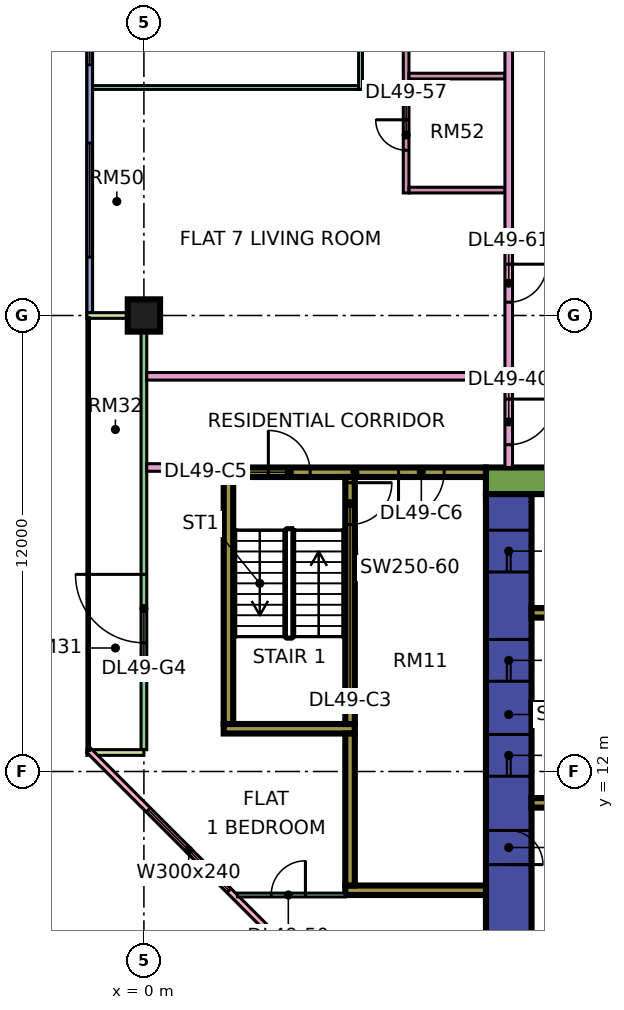
"""IFC4 building model, lengths in metres.
Left out: names, types, materials, properties, quantities, classifications, styles, units other than length and angle.
Written with IfcOpenShell. Run it as: python <this file> out.ifc"""

import sys

from ifc_helpers import new_model, si_unit, direction, frame, frame_2d, origin, origin_2d, place, context, subcontext, project, spatial, rectangle, extrude, element, fill, save


model = new_model("IFC4")
c1 = context("Model", 3, precision=1e-05, world=origin(), true_north=direction((0.0, 1.0)))
c2 = subcontext(c1, "Body", "Model", "MODEL_VIEW")
j1 = project(units=[si_unit("LENGTHUNIT", "METRE"), si_unit("PLANEANGLEUNIT", "RADIAN")], contexts=[c1])
p1 = place(None, origin())
s1 = spatial("IfcSite", under=j1, at=p1, CompositionType="ELEMENT")
p2 = place(p1, origin())
s2 = spatial("IfcBuilding", under=s1, at=p2, CompositionType="ELEMENT")
p3 = place(p2, frame((0.0, 0.0, 211.65)))
s3 = spatial("IfcBuildingStorey", under=s2, at=p3, CompositionType="ELEMENT", Elevation=211.65)
p4 = place(p3, frame((0.0, 24.0, 0.0), z_axis=(0.0, 0.0, 1.0), x_axis=(1.0, 0.0, 0.0)))
e1 = element("IfcColumn", 1, at=p4, inside=s3, PredefinedType="COLUMN", context=c2, shape_type="SweptSolid", body=[
    extrude(rectangle(XDim=0.85, YDim=0.85, at=origin_2d()), origin(), (0.0, 0.0, 1.0), 3.75),
])
p5 = place(p3, frame((9.0, 19.65, 0.0), z_axis=(0.0, 0.0, 1.0), x_axis=(1.0, 0.0, 0.0)))
e2 = element("IfcWall", 2, at=p5, inside=s3, PredefinedType="SHEAR", context=c2, shape_type="SweptSolid", body=[
    extrude(rectangle(XDim=25.0, YDim=0.7, at=frame_2d((12.5, 0.0))), origin(), (0.0, 0.0, 1.0), 3.75),
])
p6 = place(p5, frame((19.1, 0.0, 0.0)))
e3 = element("IfcOpeningElement", 3, at=p6, cuts=e2, PredefinedType="OPENING", context=c2, shape_type="SweptSolid", body=[
    extrude(rectangle(XDim=1.8, YDim=2.4, at=frame_2d((0.9, 1.2))), frame((0.0, 0.36, 0.0), z_axis=(0.0, -1.0, 0.0), x_axis=(1.0, 0.0, 0.0)), (0.0, 0.0, 1.0), 0.72),
])
p7 = place(p3, frame((9.6, 7.7, 0.0), z_axis=(0.0, 0.0, 1.0), x_axis=(0.0, 1.0, 0.0)))
e4 = element("IfcWall", 4, at=p7, inside=s3, PredefinedType="SHEAR", context=c2, shape_type="SweptSolid", body=[
    extrude(rectangle(XDim=11.6, YDim=1.2, at=frame_2d((5.8, 0.0))), origin(), (0.0, 0.0, 1.0), 3.75),
])
p8 = place(p7, frame((4.175, 0.0, 0.0)))
e5 = element("IfcOpeningElement", 5, at=p8, cuts=e4, PredefinedType="OPENING", context=c2, shape_type="SweptSolid", body=[
    extrude(rectangle(XDim=1.1, YDim=2.2, at=frame_2d((0.55, 1.1))), frame((0.0, 0.61, 0.0), z_axis=(0.0, -1.0, 0.0), x_axis=(1.0, 0.0, 0.0)), (0.0, 0.0, 1.0), 1.22),
])
p9 = place(p7, frame((6.675, 0.0, 0.0)))
e6 = element("IfcOpeningElement", 6, at=p9, cuts=e4, PredefinedType="OPENING", context=c2, shape_type="SweptSolid", body=[
    extrude(rectangle(XDim=1.1, YDim=2.2, at=frame_2d((0.55, 1.1))), frame((0.0, 0.61, 0.0), z_axis=(0.0, -1.0, 0.0), x_axis=(1.0, 0.0, 0.0)), (0.0, 0.0, 1.0), 1.22),
])
p10 = place(p7, frame((9.55, 0.0, 0.0)))
e7 = element("IfcOpeningElement", 7, at=p10, cuts=e4, PredefinedType="OPENING", context=c2, shape_type="SweptSolid", body=[
    extrude(rectangle(XDim=1.1, YDim=2.2, at=frame_2d((0.55, 1.1))), frame((0.0, 0.61, 0.0), z_axis=(0.0, -1.0, 0.0), x_axis=(1.0, 0.0, 0.0)), (0.0, 0.0, 1.0), 1.22),
])
p11 = place(p7, frame((1.85, 0.0, 0.0)))
e8 = element("IfcOpeningElement", 8, at=p11, cuts=e4, PredefinedType="OPENING", context=c2, shape_type="SweptSolid", body=[
    extrude(rectangle(XDim=0.9, YDim=2.1, at=frame_2d((0.45, 1.05))), frame((0.0, 0.61, 0.0), z_axis=(0.0, -1.0, 0.0), x_axis=(1.0, 0.0, 0.0)), (0.0, 0.0, 1.0), 1.22),
])
for number, where, z_axis, x_axis in (
    (9, (10.2, 11.175, 0.0), (0.0, 0.0, 1.0), (1.0, 0.0, 0.0)),
    (10, (10.2, 13.675, 0.0), (0.0, 0.0, 1.0), (1.0, 0.0, 0.0)),
    (11, (10.2, 16.175, 0.0), (0.0, 0.0, 1.0), (1.0, 0.0, 0.0)),
):
    element("IfcWall", number, at=place(p3, frame(where, z_axis=z_axis, x_axis=x_axis)), inside=s3, PredefinedType="SHEAR", context=c2, shape_type="SweptSolid", body=[
        extrude(rectangle(XDim=3.0, YDim=0.25, at=frame_2d((1.5, 0.0))), origin(), (0.0, 0.0, 1.0), 3.75),
    ])
p12 = place(p3, frame((2.1, 19.875, 0.0), z_axis=(0.0, 0.0, 1.0), x_axis=(1.0, 0.0, 0.0)))
e12 = element("IfcWall", 12, at=p12, inside=s3, PredefinedType="SHEAR", context=c2, shape_type="SweptSolid", body=[
    extrude(rectangle(XDim=6.9, YDim=0.25, at=frame_2d((3.45, 0.0))), origin(), (0.0, 0.0, 1.0), 3.75),
])
p13 = place(p12, frame((1.175, 0.0, 0.0)))
e13 = element("IfcOpeningElement", 13, at=p13, cuts=e12, PredefinedType="OPENING", context=c2, shape_type="SweptSolid", body=[
    extrude(rectangle(XDim=1.1, YDim=2.2, at=frame_2d((0.55, 1.1))), frame((0.0, 0.135, 0.0), z_axis=(0.0, -1.0, 0.0), x_axis=(1.0, 0.0, 0.0)), (0.0, 0.0, 1.0), 0.27),
])
p14 = place(p12, frame((4.6, 0.0, 0.0)))
e14 = element("IfcOpeningElement", 14, at=p14, cuts=e12, PredefinedType="OPENING", context=c2, shape_type="SweptSolid", body=[
    extrude(rectangle(XDim=1.2, YDim=2.2, at=frame_2d((0.6, 1.1))), frame((0.0, 0.135, 0.0), z_axis=(0.0, -1.0, 0.0), x_axis=(1.0, 0.0, 0.0)), (0.0, 0.0, 1.0), 0.27),
])
p15 = place(p3, frame((2.1, 13.125, 0.0), z_axis=(0.0, 0.0, 1.0), x_axis=(1.0, 0.0, 0.0)))
e15 = element("IfcWall", 15, at=p15, inside=s3, PredefinedType="SHEAR", context=c2, shape_type="SweptSolid", body=[
    extrude(rectangle(XDim=3.45, YDim=0.25, at=frame_2d((1.725, 0.0))), origin(), (0.0, 0.0, 1.0), 3.75),
])
p16 = place(p3, frame((2.225, 13.25, 0.0), z_axis=(0.0, 0.0, 1.0), x_axis=(0.0, 1.0, 0.0)))
e16 = element("IfcWall", 16, at=p16, inside=s3, PredefinedType="SHEAR", context=c2, shape_type="SweptSolid", body=[
    extrude(rectangle(XDim=6.5, YDim=0.25, at=frame_2d((3.25, 0.0))), origin(), (0.0, 0.0, 1.0), 3.75),
])
p17 = place(p3, frame((5.425, 13.25, 0.0), z_axis=(0.0, 0.0, 1.0), x_axis=(0.0, 1.0, 0.0)))
e17 = element("IfcWall", 17, at=p17, inside=s3, PredefinedType="SHEAR", context=c2, shape_type="SweptSolid", body=[
    extrude(rectangle(XDim=6.5, YDim=0.25, at=frame_2d((3.25, 0.0))), origin(), (0.0, 0.0, 1.0), 3.75),
])
p18 = place(p17, frame((5.25, 0.0, 0.0)))
e18 = element("IfcOpeningElement", 18, at=p18, cuts=e17, PredefinedType="OPENING", context=c2, shape_type="SweptSolid", body=[
    extrude(rectangle(XDim=1.1, YDim=2.2, at=frame_2d((0.55, 1.1))), frame((0.0, 0.135, 0.0), z_axis=(0.0, -1.0, 0.0), x_axis=(1.0, 0.0, 0.0)), (0.0, 0.0, 1.0), 0.27),
])
p19 = place(p3, frame((5.3, 8.875, 0.0), z_axis=(0.0, 0.0, 1.0), x_axis=(1.0, 0.0, 0.0)))
e19 = element("IfcWall", 19, at=p19, inside=s3, PredefinedType="SHEAR", context=c2, shape_type="SweptSolid", body=[
    extrude(rectangle(XDim=3.7, YDim=0.25, at=frame_2d((1.85, 0.0))), origin(), (0.0, 0.0, 1.0), 3.75),
])
p20 = place(p3, frame((5.425, 9.0, 0.0), z_axis=(0.0, 0.0, 1.0), x_axis=(0.0, 1.0, 0.0)))
e20 = element("IfcWall", 20, at=p20, inside=s3, PredefinedType="SHEAR", context=c2, shape_type="SweptSolid", body=[
    extrude(rectangle(XDim=4.0, YDim=0.25, at=frame_2d((2.0, 0.0))), origin(), (0.0, 0.0, 1.0), 3.75),
])
p21 = place(p3, frame((-1.425, 35.925, 0.0), z_axis=(0.0, 0.0, 1.0), x_axis=(0.0, -1.0, 0.0)))
e21 = element("IfcWall", 21, at=p21, inside=s3, PredefinedType="SOLIDWALL", context=c2, shape_type="SweptSolid", body=[
    extrude(rectangle(XDim=11.85, YDim=0.15, at=frame_2d((5.925, 0.0))), origin(), (0.0, 0.0, 1.0), 3.35),
])
p22 = place(p21, frame((0.562, 0.0, 0.45)))
e22 = element("IfcOpeningElement", 22, at=p22, cuts=e21, PredefinedType="OPENING", context=c2, shape_type="SweptSolid", body=[
    extrude(rectangle(XDim=1.8, YDim=2.4, at=frame_2d((0.9, 1.2))), frame((0.0, 0.085, 0.0), z_axis=(0.0, -1.0, 0.0), x_axis=(1.0, 0.0, 0.0)), (0.0, 0.0, 1.0), 0.17),
])
p23 = place(p21, frame((3.525, 0.0, 0.45)))
e23 = element("IfcOpeningElement", 23, at=p23, cuts=e21, PredefinedType="OPENING", context=c2, shape_type="SweptSolid", body=[
    extrude(rectangle(XDim=1.8, YDim=2.4, at=frame_2d((0.9, 1.2))), frame((0.0, 0.085, 0.0), z_axis=(0.0, -1.0, 0.0), x_axis=(1.0, 0.0, 0.0)), (0.0, 0.0, 1.0), 0.17),
])
p24 = place(p21, frame((7.387, 0.0, 0.45)))
e24 = element("IfcOpeningElement", 24, at=p24, cuts=e21, PredefinedType="OPENING", context=c2, shape_type="SweptSolid", body=[
    extrude(rectangle(XDim=3.0, YDim=2.4, at=frame_2d((1.5, 1.2))), frame((0.0, 0.085, 0.0), z_axis=(0.0, -1.0, 0.0), x_axis=(1.0, 0.0, 0.0)), (0.0, 0.0, 1.0), 0.17),
])
p25 = place(p3, frame((0.0, 23.925, 0.0), z_axis=(0.0, 0.0, 1.0), x_axis=(0.0, -1.0, 0.0)))
e25 = element("IfcWall", 25, at=p25, inside=s3, PredefinedType="SOLIDWALL", context=c2, shape_type="SweptSolid", body=[
    extrude(rectangle(XDim=11.35, YDim=0.15, at=frame_2d((5.675, 0.0))), origin(), (0.0, 0.0, 1.0), 3.35),
])
p26 = place(p25, frame((6.738, 0.0, 0.0)))
e26 = element("IfcOpeningElement", 26, at=p26, cuts=e25, PredefinedType="OPENING", context=c2, shape_type="SweptSolid", body=[
    extrude(rectangle(XDim=1.8, YDim=2.4, at=frame_2d((0.9, 1.2))), frame((0.0, 0.085, 0.0), z_axis=(0.0, -1.0, 0.0), x_axis=(1.0, 0.0, 0.0)), (0.0, 0.0, 1.0), 0.17),
])
for number, where, z_axis, x_axis in (
    (27, (-1.5, 24.0, 0.0), (0.0, 0.0, 1.0), (1.0, 0.0, 0.0)),
    (28, (-1.5, 12.5, 0.0), (0.0, 0.0, 1.0), (1.0, 0.0, 0.0)),
):
    element("IfcWall", number, at=place(p3, frame(where, z_axis=z_axis, x_axis=x_axis)), inside=s3, PredefinedType="SOLIDWALL", context=c2, shape_type="SweptSolid", body=[
        extrude(rectangle(XDim=1.5, YDim=0.15, at=frame_2d((0.75, 0.0))), origin(), (0.0, 0.0, 1.0), 3.35),
    ])
p27 = place(p3, frame((-1.447, 12.553, 0.0), z_axis=(0.0, 0.0, 1.0), x_axis=(0.707106781187, -0.707106781187, 0.0)))
e29 = element("IfcWall", 29, at=p27, inside=s3, PredefinedType="SOLIDWALL", context=c2, shape_type="SweptSolid", body=[
    extrude(rectangle(XDim=19.799, YDim=0.15, at=frame_2d((9.899, 0.0))), origin(), (0.0, 0.0, 1.0), 3.35),
])
p28 = place(p27, frame((2.212, 0.0, 0.45)))
e30 = element("IfcOpeningElement", 30, at=p28, cuts=e29, PredefinedType="OPENING", context=c2, shape_type="SweptSolid", body=[
    extrude(rectangle(XDim=3.0, YDim=2.4, at=frame_2d((1.5, 1.2))), frame((0.0, 0.085, 0.0), z_axis=(0.0, -1.0, 0.0), x_axis=(1.0, 0.0, 0.0)), (0.0, 0.0, 1.0), 0.17),
])
p29 = place(p27, frame((10.216, 0.0, 0.45)))
e31 = element("IfcOpeningElement", 31, at=p29, cuts=e29, PredefinedType="OPENING", context=c2, shape_type="SweptSolid", body=[
    extrude(rectangle(XDim=3.0, YDim=2.4, at=frame_2d((1.5, 1.2))), frame((0.0, 0.085, 0.0), z_axis=(0.0, -1.0, 0.0), x_axis=(1.0, 0.0, 0.0)), (0.0, 0.0, 1.0), 0.17),
])
p30 = place(p3, frame((-1.35, 30.0, 0.0), z_axis=(0.0, 0.0, 1.0), x_axis=(1.0, 0.0, 0.0)))
e32 = element("IfcWall", 32, at=p30, inside=s3, PredefinedType="PARTITIONING", context=c2, shape_type="SweptSolid", body=[
    extrude(rectangle(XDim=7.0, YDim=0.1, at=frame_2d((3.5, 0.0))), origin(), (0.0, 0.0, 1.0), 3.35),
])
p31 = place(p3, frame((0.074, 20.0, 0.0), z_axis=(0.0, 0.0, 1.0), x_axis=(1.0, 0.0, 0.0)))
e33 = element("IfcWall", 33, at=p31, inside=s3, PredefinedType="PARTITIONING", context=c2, shape_type="SweptSolid", body=[
    extrude(rectangle(XDim=2.026, YDim=0.2, at=frame_2d((1.013, 0.0))), origin(), (0.0, 0.0, 1.0), 3.35),
])
p32 = place(p3, frame((0.074, 22.4, 0.0), z_axis=(0.0, 0.0, 1.0), x_axis=(1.0, 0.0, 0.0)))
e34 = element("IfcWall", 34, at=p32, inside=s3, PredefinedType="PARTITIONING", context=c2, shape_type="SweptSolid", body=[
    extrude(rectangle(XDim=9.426, YDim=0.2, at=frame_2d((4.713, 0.0))), origin(), (0.0, 0.0, 1.0), 3.35),
])
p33 = place(p3, frame((2.461, 8.75, 0.0), z_axis=(0.0, 0.0, 1.0), x_axis=(1.0, 0.0, 0.0)))
e35 = element("IfcWall", 35, at=p33, inside=s3, PredefinedType="PARTITIONING", context=c2, shape_type="SweptSolid", body=[
    extrude(rectangle(XDim=2.839, YDim=0.1, at=frame_2d((1.419, 0.0))), origin(), (0.0, 0.0, 1.0), 3.35),
])
p34 = place(p33, frame((0.889, 0.0, 0.0)))
e36 = element("IfcOpeningElement", 36, at=p34, cuts=e35, PredefinedType="OPENING", context=c2, shape_type="SweptSolid", body=[
    extrude(rectangle(XDim=0.9, YDim=2.1, at=frame_2d((0.45, 1.05))), frame((0.0, 0.06, 0.0), z_axis=(0.0, -1.0, 0.0), x_axis=(1.0, 0.0, 0.0)), (0.0, 0.0, 1.0), 0.12),
])
p35 = place(p3, frame((5.7, 29.95, 0.0), z_axis=(0.0, 0.0, 1.0), x_axis=(0.0, 1.0, 0.0)))
e37 = element("IfcWall", 37, at=p35, inside=s3, PredefinedType="PARTITIONING", context=c2, shape_type="SweptSolid", body=[
    extrude(rectangle(XDim=5.95, YDim=0.1, at=frame_2d((2.975, 0.0))), origin(), (0.0, 0.0, 1.0), 3.35),
])
p36 = place(p35, frame((1.1, 0.0, 0.0)))
e38 = element("IfcOpeningElement", 38, at=p36, cuts=e37, PredefinedType="OPENING", context=c2, shape_type="SweptSolid", body=[
    extrude(rectangle(XDim=0.9, YDim=2.1, at=frame_2d((0.45, 1.05))), frame((0.0, 0.06, 0.0), z_axis=(0.0, -1.0, 0.0), x_axis=(1.0, 0.0, 0.0)), (0.0, 0.0, 1.0), 0.12),
])
p37 = place(p35, frame((4.1, 0.0, 0.0)))
e39 = element("IfcOpeningElement", 39, at=p37, cuts=e37, PredefinedType="OPENING", context=c2, shape_type="SweptSolid", body=[
    extrude(rectangle(XDim=0.9, YDim=2.1, at=frame_2d((0.45, 1.05))), frame((0.0, 0.06, 0.0), z_axis=(0.0, -1.0, 0.0), x_axis=(1.0, 0.0, 0.0)), (0.0, 0.0, 1.0), 0.12),
])
p38 = place(p3, frame((6.9, 27.225, 0.0), z_axis=(0.0, 0.0, 1.0), x_axis=(0.0, 1.0, 0.0)))
e40 = element("IfcWall", 40, at=p38, inside=s3, PredefinedType="PARTITIONING", context=c2, shape_type="SweptSolid", body=[
    extrude(rectangle(XDim=8.675, YDim=0.15, at=frame_2d((4.337, 0.0))), origin(), (0.0, 0.0, 1.0), 3.35),
])
p39 = place(p38, frame((1.125, 0.0, 0.0)))
e41 = element("IfcOpeningElement", 41, at=p39, cuts=e40, PredefinedType="OPENING", context=c2, shape_type="SweptSolid", body=[
    extrude(rectangle(XDim=0.8, YDim=2.1, at=frame_2d((0.4, 1.05))), frame((0.0, 0.085, 0.0), z_axis=(0.0, -1.0, 0.0), x_axis=(1.0, 0.0, 0.0)), (0.0, 0.0, 1.0), 0.17),
])
p40 = place(p38, frame((5.475, 0.0, 0.0)))
e42 = element("IfcOpeningElement", 42, at=p40, cuts=e40, PredefinedType="OPENING", context=c2, shape_type="SweptSolid", body=[
    extrude(rectangle(XDim=0.9, YDim=2.1, at=frame_2d((0.45, 1.05))), frame((0.0, 0.085, 0.0), z_axis=(0.0, -1.0, 0.0), x_axis=(1.0, 0.0, 0.0)), (0.0, 0.0, 1.0), 0.17),
])
for number, where, z_axis, x_axis in (
    (43, (6.975, 27.3, 0.0), (0.0, 0.0, 1.0), (1.0, 0.0, 0.0)),
    (44, (6.975, 30.3, 0.0), (0.0, 0.0, 1.0), (1.0, 0.0, 0.0)),
):
    element("IfcWall", number, at=place(p3, frame(where, z_axis=z_axis, x_axis=x_axis)), inside=s3, PredefinedType="PARTITIONING", context=c2, shape_type="SweptSolid", body=[
        extrude(rectangle(XDim=2.525, YDim=0.15, at=frame_2d((1.262, 0.0))), origin(), (0.0, 0.0, 1.0), 3.35),
    ])
p41 = place(p3, frame((9.6, 20.0, 0.0), z_axis=(0.0, 0.0, 1.0), x_axis=(0.0, 1.0, 0.0)))
e45 = element("IfcWall", 45, at=p41, inside=s3, PredefinedType="PARTITIONING", context=c2, shape_type="SweptSolid", body=[
    extrude(rectangle(XDim=44.35, YDim=0.2, at=frame_2d((22.175, 0.0))), origin(), (0.0, 0.0, 1.0), 3.35),
])
p42 = place(p41, frame((17.25, 0.0, 0.0)))
e46 = element("IfcOpeningElement", 46, at=p42, cuts=e45, PredefinedType="OPENING", context=c2, shape_type="SweptSolid", body=[
    extrude(rectangle(XDim=1.0, YDim=2.1, at=frame_2d((0.5, 1.05))), frame((0.0, 0.11, 0.0), z_axis=(0.0, -1.0, 0.0), x_axis=(1.0, 0.0, 0.0)), (0.0, 0.0, 1.0), 0.22),
])
p43 = place(p41, frame((0.6, 0.0, 0.0)))
e47 = element("IfcOpeningElement", 47, at=p43, cuts=e45, PredefinedType="OPENING", context=c2, shape_type="SweptSolid", body=[
    extrude(rectangle(XDim=1.2, YDim=2.1, at=frame_2d((0.6, 1.05))), frame((0.0, 0.11, 0.0), z_axis=(0.0, -1.0, 0.0), x_axis=(1.0, 0.0, 0.0)), (0.0, 0.0, 1.0), 0.22),
])
p44 = place(p41, frame((4.35, 0.0, 0.0)))
e48 = element("IfcOpeningElement", 48, at=p44, cuts=e45, PredefinedType="OPENING", context=c2, shape_type="SweptSolid", body=[
    extrude(rectangle(XDim=1.0, YDim=2.1, at=frame_2d((0.5, 1.05))), frame((0.0, 0.11, 0.0), z_axis=(0.0, -1.0, 0.0), x_axis=(1.0, 0.0, 0.0)), (0.0, 0.0, 1.0), 0.22),
])
p45 = place(p23, origin())
e49 = element("IfcWindow", 49, at=p45, inside=s3, PartitioningType="SINGLE_PANEL", PredefinedType="WINDOW", context=c2, shape_type="SweptSolid", body=[
    extrude(rectangle(XDim=1.8, YDim=2.4, at=frame_2d((0.9, 1.2))), frame((0.0, 0.03, 0.0), z_axis=(0.0, -1.0, 0.0), x_axis=(1.0, 0.0, 0.0)), (0.0, 0.0, 1.0), 0.06),
])
fill(e23, e49)
p46 = place(p24, origin())
e50 = element("IfcWindow", 50, at=p46, inside=s3, PartitioningType="SINGLE_PANEL", PredefinedType="WINDOW", context=c2, shape_type="SweptSolid", body=[
    extrude(rectangle(XDim=3.0, YDim=2.4, at=frame_2d((1.5, 1.2))), frame((0.0, 0.03, 0.0), z_axis=(0.0, -1.0, 0.0), x_axis=(1.0, 0.0, 0.0)), (0.0, 0.0, 1.0), 0.06),
])
fill(e24, e50)
p47 = place(p26, frame((1.8, 0.0, 0.0), z_axis=(0.0, 0.0, 1.0), x_axis=(-1.0, 0.0, 0.0)))
e51 = element("IfcDoor", 51, at=p47, inside=s3, OperationType="DOUBLE_DOOR_SINGLE_SWING", PredefinedType="DOOR", context=c2, shape_type="SweptSolid", body=[
    extrude(rectangle(XDim=1.8, YDim=2.4, at=frame_2d((0.9, 1.2))), frame((0.0, 0.025, 0.0), z_axis=(0.0, -1.0, 0.0), x_axis=(1.0, 0.0, 0.0)), (0.0, 0.0, 1.0), 0.05),
])
fill(e26, e51)
p48 = place(p28, origin())
e52 = element("IfcWindow", 52, at=p48, inside=s3, PartitioningType="SINGLE_PANEL", PredefinedType="WINDOW", context=c2, shape_type="SweptSolid", body=[
    extrude(rectangle(XDim=3.0, YDim=2.4, at=frame_2d((1.5, 1.2))), frame((0.0, 0.03, 0.0), z_axis=(0.0, -1.0, 0.0), x_axis=(1.0, 0.0, 0.0)), (0.0, 0.0, 1.0), 0.06),
])
fill(e30, e52)
p49 = place(p8, origin())
e53 = element("IfcDoor", 53, at=p49, inside=s3, OperationType="DOUBLE_DOOR_SLIDING", PredefinedType="DOOR", context=c2, shape_type="SweptSolid", body=[
    extrude(rectangle(XDim=1.1, YDim=2.2, at=frame_2d((0.55, 1.1))), frame((0.0, 0.025, 0.0), z_axis=(0.0, -1.0, 0.0), x_axis=(1.0, 0.0, 0.0)), (0.0, 0.0, 1.0), 0.05),
])
fill(e5, e53)
p50 = place(p9, origin())
e54 = element("IfcDoor", 54, at=p50, inside=s3, OperationType="DOUBLE_DOOR_SLIDING", PredefinedType="DOOR", context=c2, shape_type="SweptSolid", body=[
    extrude(rectangle(XDim=1.1, YDim=2.2, at=frame_2d((0.55, 1.1))), frame((0.0, 0.025, 0.0), z_axis=(0.0, -1.0, 0.0), x_axis=(1.0, 0.0, 0.0)), (0.0, 0.0, 1.0), 0.05),
])
fill(e6, e54)
p51 = place(p10, origin())
e55 = element("IfcDoor", 55, at=p51, inside=s3, OperationType="DOUBLE_DOOR_SLIDING", PredefinedType="DOOR", context=c2, shape_type="SweptSolid", body=[
    extrude(rectangle(XDim=1.1, YDim=2.2, at=frame_2d((0.55, 1.1))), frame((0.0, 0.025, 0.0), z_axis=(0.0, -1.0, 0.0), x_axis=(1.0, 0.0, 0.0)), (0.0, 0.0, 1.0), 0.05),
])
fill(e7, e55)
p52 = place(p18, origin())
e56 = element("IfcDoor", 56, at=p52, inside=s3, OperationType="SINGLE_SWING_RIGHT", PredefinedType="DOOR", context=c2, shape_type="SweptSolid", body=[
    extrude(rectangle(XDim=1.1, YDim=2.2, at=frame_2d((0.55, 1.1))), frame((0.0, 0.025, 0.0), z_axis=(0.0, -1.0, 0.0), x_axis=(1.0, 0.0, 0.0)), (0.0, 0.0, 1.0), 0.05),
])
fill(e18, e56)
p53 = place(p11, frame((0.9, 0.0, 0.0), z_axis=(0.0, 0.0, 1.0), x_axis=(-1.0, 0.0, 0.0)))
e57 = element("IfcDoor", 57, at=p53, inside=s3, OperationType="SINGLE_SWING_LEFT", PredefinedType="DOOR", context=c2, shape_type="SweptSolid", body=[
    extrude(rectangle(XDim=0.9, YDim=2.1, at=frame_2d((0.45, 1.05))), frame((0.0, 0.025, 0.0), z_axis=(0.0, -1.0, 0.0), x_axis=(1.0, 0.0, 0.0)), (0.0, 0.0, 1.0), 0.05),
])
fill(e8, e57)
p54 = place(p13, origin())
e58 = element("IfcDoor", 58, at=p54, inside=s3, OperationType="SINGLE_SWING_LEFT", PredefinedType="DOOR", context=c2, shape_type="SweptSolid", body=[
    extrude(rectangle(XDim=1.1, YDim=2.2, at=frame_2d((0.55, 1.1))), frame((0.0, 0.025, 0.0), z_axis=(0.0, -1.0, 0.0), x_axis=(1.0, 0.0, 0.0)), (0.0, 0.0, 1.0), 0.05),
])
fill(e13, e58)
p55 = place(p14, frame((1.2, 0.0, 0.0), z_axis=(0.0, 0.0, 1.0), x_axis=(-1.0, 0.0, 0.0)))
e59 = element("IfcDoor", 59, at=p55, inside=s3, OperationType="SINGLE_SWING_LEFT", PredefinedType="DOOR", context=c2, shape_type="SweptSolid", body=[
    extrude(rectangle(XDim=1.2, YDim=2.2, at=frame_2d((0.6, 1.1))), frame((0.0, 0.025, 0.0), z_axis=(0.0, -1.0, 0.0), x_axis=(1.0, 0.0, 0.0)), (0.0, 0.0, 1.0), 0.05),
])
fill(e14, e59)
p56 = place(p43, origin())
e60 = element("IfcDoor", 60, at=p56, inside=s3, OperationType="SINGLE_SWING_RIGHT", PredefinedType="DOOR", context=c2, shape_type="SweptSolid", body=[
    extrude(rectangle(XDim=1.2, YDim=2.1, at=frame_2d((0.6, 1.05))), frame((0.0, 0.025, 0.0), z_axis=(0.0, -1.0, 0.0), x_axis=(1.0, 0.0, 0.0)), (0.0, 0.0, 1.0), 0.05),
])
fill(e47, e60)
p57 = place(p34, frame((0.9, 0.0, 0.0), z_axis=(0.0, 0.0, 1.0), x_axis=(-1.0, 0.0, 0.0)))
e61 = element("IfcDoor", 61, at=p57, inside=s3, OperationType="SINGLE_SWING_RIGHT", PredefinedType="DOOR", context=c2, shape_type="SweptSolid", body=[
    extrude(rectangle(XDim=0.9, YDim=2.1, at=frame_2d((0.45, 1.05))), frame((0.0, 0.025, 0.0), z_axis=(0.0, -1.0, 0.0), x_axis=(1.0, 0.0, 0.0)), (0.0, 0.0, 1.0), 0.05),
])
fill(e36, e61)
p58 = place(p39, frame((0.8, 0.0, 0.0), z_axis=(0.0, 0.0, 1.0), x_axis=(-1.0, 0.0, 0.0)))
e62 = element("IfcDoor", 62, at=p58, inside=s3, OperationType="SINGLE_SWING_RIGHT", PredefinedType="DOOR", context=c2, shape_type="SweptSolid", body=[
    extrude(rectangle(XDim=0.8, YDim=2.1, at=frame_2d((0.4, 1.05))), frame((0.0, 0.025, 0.0), z_axis=(0.0, -1.0, 0.0), x_axis=(1.0, 0.0, 0.0)), (0.0, 0.0, 1.0), 0.05),
])
fill(e41, e62)
p59 = place(p44, origin())
e63 = element("IfcDoor", 63, at=p59, inside=s3, OperationType="SINGLE_SWING_RIGHT", PredefinedType="DOOR", context=c2, shape_type="SweptSolid", body=[
    extrude(rectangle(XDim=1.0, YDim=2.1, at=frame_2d((0.5, 1.05))), frame((0.0, 0.025, 0.0), z_axis=(0.0, -1.0, 0.0), x_axis=(1.0, 0.0, 0.0)), (0.0, 0.0, 1.0), 0.05),
])
fill(e48, e63)
save(model, sys.argv[1])
